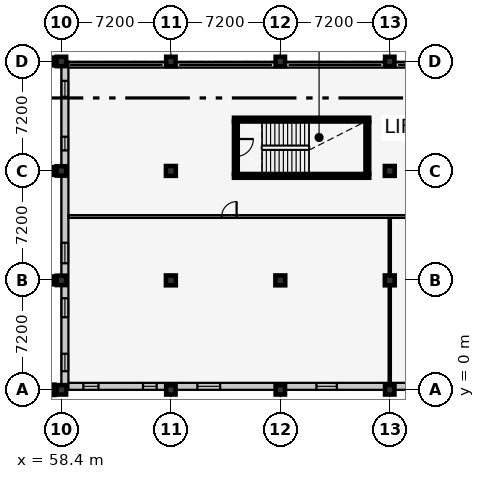
"""IFC4 building model, lengths in metres.
Left out: names, types, materials, properties, quantities, classifications, styles, units other than length and angle.
Written with IfcOpenShell. Run it as: python <this file> out.ifc"""

import sys

from ifc_helpers import new_model, si_unit, direction, frame, frame_2d, origin, origin_2d, place, context, subcontext, project, spatial, rectangle, extrude, element, fill, save


model = new_model("IFC4")
c1 = context("Model", 3, precision=1e-05, world=origin(), true_north=direction((0.0, 1.0)))
c2 = subcontext(c1, "Body", "Model", "MODEL_VIEW")
j1 = project(units=[si_unit("LENGTHUNIT", "METRE"), si_unit("PLANEANGLEUNIT", "RADIAN")], contexts=[c1])
p1 = place(None, origin())
s1 = spatial("IfcSite", under=j1, at=p1, CompositionType="ELEMENT")
p2 = place(p1, origin())
s2 = spatial("IfcBuilding", under=s1, at=p2, CompositionType="ELEMENT")
p3 = place(p2, frame((0.0, 0.0, 5.4)))
s3 = spatial("IfcBuildingStorey", under=s2, at=p3, CompositionType="ELEMENT", Elevation=5.4)
p4 = place(p3, frame((57.6, 0.0, 0.0), z_axis=(0.0, 0.0, 1.0), x_axis=(1.0, 0.0, 0.0)))
e1 = element("IfcColumn", 1, at=p4, inside=s3, PredefinedType="COLUMN", context=c2, shape_type="SweptSolid", body=[
    extrude(rectangle(XDim=0.68, YDim=0.68, at=origin_2d()), origin(), (0.0, 0.0, 1.0), 4.2),
])
for number, where, z_axis, x_axis in (
    (2, (57.6, 7.2, 0.0), (0.0, 0.0, 1.0), (1.0, 0.0, 0.0)),
    (3, (57.6, 14.4, 0.0), (0.0, 0.0, 1.0), (1.0, 0.0, 0.0)),
    (4, (57.6, 21.6, 0.0), (0.0, 0.0, 1.0), (1.0, 0.0, 0.0)),
):
    element("IfcColumn", number, at=place(p3, frame(where, z_axis=z_axis, x_axis=x_axis)), inside=s3, PredefinedType="COLUMN", context=c2, shape_type="SweptSolid", body=[
        extrude(rectangle(XDim=0.52, YDim=0.52, at=origin_2d()), origin(), (0.0, 0.0, 1.0), 4.2),
    ])
for number, where, z_axis, x_axis in (
    (5, (58.4, 0.0, 0.0), (0.0, 0.0, 1.0), (1.0, 0.0, 0.0)),
    (6, (58.4, 7.2, 0.0), (0.0, 0.0, 1.0), (1.0, 0.0, 0.0)),
    (7, (58.4, 14.4, 0.0), (0.0, 0.0, 1.0), (1.0, 0.0, 0.0)),
    (8, (58.4, 21.6, 0.0), (0.0, 0.0, 1.0), (1.0, 0.0, 0.0)),
    (9, (65.6, 0.0, 0.0), (0.0, 0.0, 1.0), (1.0, 0.0, 0.0)),
):
    element("IfcColumn", number, at=place(p3, frame(where, z_axis=z_axis, x_axis=x_axis)), inside=s3, PredefinedType="COLUMN", context=c2, shape_type="SweptSolid", body=[
        extrude(rectangle(XDim=0.62, YDim=0.62, at=origin_2d()), origin(), (0.0, 0.0, 1.0), 4.2),
    ])
for number, where, z_axis, x_axis in (
    (10, (65.6, 7.2, 0.0), (0.0, 0.0, 1.0), (1.0, 0.0, 0.0)),
    (11, (65.6, 14.4, 0.0), (0.0, 0.0, 1.0), (1.0, 0.0, 0.0)),
):
    element("IfcColumn", number, at=place(p3, frame(where, z_axis=z_axis, x_axis=x_axis)), inside=s3, PredefinedType="COLUMN", context=c2, shape_type="SweptSolid", body=[
        extrude(rectangle(XDim=0.65, YDim=0.65, at=origin_2d()), origin(), (0.0, 0.0, 1.0), 4.2),
    ])
for number, where, z_axis, x_axis in (
    (12, (65.6, 21.6, 0.0), (0.0, 0.0, 1.0), (1.0, 0.0, 0.0)),
    (13, (72.8, 0.0, 0.0), (0.0, 0.0, 1.0), (1.0, 0.0, 0.0)),
):
    element("IfcColumn", number, at=place(p3, frame(where, z_axis=z_axis, x_axis=x_axis)), inside=s3, PredefinedType="COLUMN", context=c2, shape_type="SweptSolid", body=[
        extrude(rectangle(XDim=0.62, YDim=0.62, at=origin_2d()), origin(), (0.0, 0.0, 1.0), 4.2),
    ])
p5 = place(p3, frame((72.8, 7.2, 0.0), z_axis=(0.0, 0.0, 1.0), x_axis=(1.0, 0.0, 0.0)))
e14 = element("IfcColumn", 14, at=p5, inside=s3, PredefinedType="COLUMN", context=c2, shape_type="SweptSolid", body=[
    extrude(rectangle(XDim=0.65, YDim=0.65, at=origin_2d()), origin(), (0.0, 0.0, 1.0), 4.2),
])
for number, where, z_axis, x_axis in (
    (15, (72.8, 21.6, 0.0), (0.0, 0.0, 1.0), (1.0, 0.0, 0.0)),
    (16, (80.0, 0.0, 0.0), (0.0, 0.0, 1.0), (1.0, 0.0, 0.0)),
):
    element("IfcColumn", number, at=place(p3, frame(where, z_axis=z_axis, x_axis=x_axis)), inside=s3, PredefinedType="COLUMN", context=c2, shape_type="SweptSolid", body=[
        extrude(rectangle(XDim=0.62, YDim=0.62, at=origin_2d()), origin(), (0.0, 0.0, 1.0), 4.2),
    ])
for number, where, z_axis, x_axis in (
    (17, (80.0, 7.2, 0.0), (0.0, 0.0, 1.0), (1.0, 0.0, 0.0)),
    (18, (80.0, 14.4, 0.0), (0.0, 0.0, 1.0), (1.0, 0.0, 0.0)),
):
    element("IfcColumn", number, at=place(p3, frame(where, z_axis=z_axis, x_axis=x_axis)), inside=s3, PredefinedType="COLUMN", context=c2, shape_type="SweptSolid", body=[
        extrude(rectangle(XDim=0.65, YDim=0.65, at=origin_2d()), origin(), (0.0, 0.0, 1.0), 4.2),
    ])
p6 = place(p3, frame((80.0, 21.6, 0.0), z_axis=(0.0, 0.0, 1.0), x_axis=(1.0, 0.0, 0.0)))
e19 = element("IfcColumn", 19, at=p6, inside=s3, PredefinedType="COLUMN", context=c2, shape_type="SweptSolid", body=[
    extrude(rectangle(XDim=0.62, YDim=0.62, at=origin_2d()), origin(), (0.0, 0.0, 1.0), 4.2),
])
p7 = place(p3, frame((108.8, 0.23, 0.0), z_axis=(0.0, 0.0, 1.0), x_axis=(-1.0, 0.0, 0.0)))
e20 = element("IfcWall", 20, at=p7, inside=s3, PredefinedType="SOLIDWALL", context=c2, shape_type="SweptSolid", body=[
    extrude(rectangle(XDim=50.4, YDim=0.46, at=frame_2d((25.2, 0.0))), origin(), (0.0, 0.0, 1.0), 3.245),
])
p8 = place(p7, frame((1.414, 0.0, 0.9)))
e21 = element("IfcOpeningElement", 21, at=p8, cuts=e20, PredefinedType="OPENING", context=c2, shape_type="SweptSolid", body=[
    extrude(rectangle(XDim=1.05, YDim=1.6, at=frame_2d((0.525, 0.8))), frame((0.0, 0.242, 0.0), z_axis=(0.0, -1.0, 0.0), x_axis=(1.0, 0.0, 0.0)), (0.0, 0.0, 1.0), 0.484),
])
p9 = place(p7, frame((9.067, 0.0, 0.9)))
e22 = element("IfcOpeningElement", 22, at=p9, cuts=e20, PredefinedType="OPENING", context=c2, shape_type="SweptSolid", body=[
    extrude(rectangle(XDim=1.25, YDim=1.6, at=frame_2d((0.625, 0.8))), frame((0.0, 0.242, 0.0), z_axis=(0.0, -1.0, 0.0), x_axis=(1.0, 0.0, 0.0)), (0.0, 0.0, 1.0), 0.484),
])
p10 = place(p7, frame((16.696, 0.0, 0.9)))
e23 = element("IfcOpeningElement", 23, at=p10, cuts=e20, PredefinedType="OPENING", context=c2, shape_type="SweptSolid", body=[
    extrude(rectangle(XDim=1.5, YDim=1.6, at=frame_2d((0.75, 0.8))), frame((0.0, 0.242, 0.0), z_axis=(0.0, -1.0, 0.0), x_axis=(1.0, 0.0, 0.0)), (0.0, 0.0, 1.0), 0.484),
])
p11 = place(p7, frame((24.64, 0.0, 0.9)))
e24 = element("IfcOpeningElement", 24, at=p11, cuts=e20, PredefinedType="OPENING", context=c2, shape_type="SweptSolid", body=[
    extrude(rectangle(XDim=1.12, YDim=1.75, at=frame_2d((0.56, 0.875))), frame((0.0, 0.242, 0.0), z_axis=(0.0, -1.0, 0.0), x_axis=(1.0, 0.0, 0.0)), (0.0, 0.0, 1.0), 0.484),
])
p12 = place(p7, frame((32.284, 0.0, 0.9)))
e25 = element("IfcOpeningElement", 25, at=p12, cuts=e20, PredefinedType="OPENING", context=c2, shape_type="SweptSolid", body=[
    extrude(rectangle(XDim=1.34, YDim=1.75, at=frame_2d((0.67, 0.875))), frame((0.0, 0.242, 0.0), z_axis=(0.0, -1.0, 0.0), x_axis=(1.0, 0.0, 0.0)), (0.0, 0.0, 1.0), 0.484),
])
p13 = place(p7, frame((39.958, 0.0, 0.9)))
e26 = element("IfcOpeningElement", 26, at=p13, cuts=e20, PredefinedType="OPENING", context=c2, shape_type="SweptSolid", body=[
    extrude(rectangle(XDim=1.5, YDim=1.75, at=frame_2d((0.75, 0.875))), frame((0.0, 0.242, 0.0), z_axis=(0.0, -1.0, 0.0), x_axis=(1.0, 0.0, 0.0)), (0.0, 0.0, 1.0), 0.484),
])
p14 = place(p7, frame((44.135, 0.0, 0.9)))
e27 = element("IfcOpeningElement", 27, at=p14, cuts=e20, PredefinedType="OPENING", context=c2, shape_type="SweptSolid", body=[
    extrude(rectangle(XDim=0.9, YDim=1.35, at=frame_2d((0.45, 0.675))), frame((0.0, 0.242, 0.0), z_axis=(0.0, -1.0, 0.0), x_axis=(1.0, 0.0, 0.0)), (0.0, 0.0, 1.0), 0.484),
])
p15 = place(p7, frame((47.961, 0.0, 0.9)))
e28 = element("IfcOpeningElement", 28, at=p15, cuts=e20, PredefinedType="OPENING", context=c2, shape_type="SweptSolid", body=[
    extrude(rectangle(XDim=1.0, YDim=1.35, at=frame_2d((0.5, 0.675))), frame((0.0, 0.242, 0.0), z_axis=(0.0, -1.0, 0.0), x_axis=(1.0, 0.0, 0.0)), (0.0, 0.0, 1.0), 0.484),
])
p16 = place(p3, frame((58.4, 21.37, 0.0), z_axis=(0.0, 0.0, 1.0), x_axis=(1.0, 0.0, 0.0)))
e29 = element("IfcWall", 29, at=p16, inside=s3, PredefinedType="SOLIDWALL", context=c2, shape_type="SweptSolid", body=[
    extrude(rectangle(XDim=50.4, YDim=0.35, at=frame_2d((25.2, 0.0))), origin(), (0.0, 0.0, 1.0), 0.85),
])
p17 = place(p3, frame((58.63, 0.0, 0.0), z_axis=(0.0, 0.0, 1.0), x_axis=(0.0, 1.0, 0.0)))
e30 = element("IfcWall", 30, at=p17, inside=s3, PredefinedType="SOLIDWALL", context=c2, shape_type="SweptSolid", body=[
    extrude(rectangle(XDim=21.6, YDim=0.46, at=frame_2d((10.8, 0.0))), origin(), (0.0, 0.0, 1.0), 3.205),
])
p18 = place(p17, frame((1.225, 0.0, 0.9)))
e31 = element("IfcOpeningElement", 31, at=p18, cuts=e30, PredefinedType="OPENING", context=c2, shape_type="SweptSolid", body=[
    extrude(rectangle(XDim=1.15, YDim=1.45, at=frame_2d((0.575, 0.725))), frame((0.0, 0.242, 0.0), z_axis=(0.0, -1.0, 0.0), x_axis=(1.0, 0.0, 0.0)), (0.0, 0.0, 1.0), 0.484),
])
p19 = place(p17, frame((4.775, 0.0, 0.9)))
e32 = element("IfcOpeningElement", 32, at=p19, cuts=e30, PredefinedType="OPENING", context=c2, shape_type="SweptSolid", body=[
    extrude(rectangle(XDim=1.25, YDim=1.45, at=frame_2d((0.625, 0.725))), frame((0.0, 0.242, 0.0), z_axis=(0.0, -1.0, 0.0), x_axis=(1.0, 0.0, 0.0)), (0.0, 0.0, 1.0), 0.484),
])
p20 = place(p17, frame((8.325, 0.0, 0.9)))
e33 = element("IfcOpeningElement", 33, at=p20, cuts=e30, PredefinedType="OPENING", context=c2, shape_type="SweptSolid", body=[
    extrude(rectangle(XDim=1.35, YDim=1.45, at=frame_2d((0.675, 0.725))), frame((0.0, 0.242, 0.0), z_axis=(0.0, -1.0, 0.0), x_axis=(1.0, 0.0, 0.0)), (0.0, 0.0, 1.0), 0.484),
])
p21 = place(p17, frame((15.75, 0.0, 0.9)))
e34 = element("IfcOpeningElement", 34, at=p21, cuts=e30, PredefinedType="OPENING", context=c2, shape_type="SweptSolid", body=[
    extrude(rectangle(XDim=0.9, YDim=1.6, at=frame_2d((0.45, 0.8))), frame((0.0, 0.242, 0.0), z_axis=(0.0, -1.0, 0.0), x_axis=(1.0, 0.0, 0.0)), (0.0, 0.0, 1.0), 0.484),
])
p22 = place(p17, frame((19.275, 0.0, 0.9)))
e35 = element("IfcOpeningElement", 35, at=p22, cuts=e30, PredefinedType="OPENING", context=c2, shape_type="SweptSolid", body=[
    extrude(rectangle(XDim=1.05, YDim=1.6, at=frame_2d((0.525, 0.8))), frame((0.0, 0.242, 0.0), z_axis=(0.0, -1.0, 0.0), x_axis=(1.0, 0.0, 0.0)), (0.0, 0.0, 1.0), 0.484),
])
for number, where, z_axis, x_axis in (
    (36, (69.75, 14.075, 0.0), (0.0, 0.0, 1.0), (1.0, 0.0, 0.0)),
    (37, (78.65, 17.775, 0.0), (0.0, 0.0, 1.0), (-1.0, 0.0, 0.0)),
):
    element("IfcWall", number, at=place(p3, frame(where, z_axis=z_axis, x_axis=x_axis)), inside=s3, PredefinedType="SHEAR", context=c2, shape_type="SweptSolid", body=[
        extrude(rectangle(XDim=8.9, YDim=0.25, at=frame_2d((4.45, 0.0))), origin(), (0.0, 0.0, 1.0), 3.95),
    ])
p23 = place(p3, frame((69.875, 17.65, 0.0), z_axis=(0.0, 0.0, 1.0), x_axis=(0.0, -1.0, 0.0)))
e38 = element("IfcWall", 38, at=p23, inside=s3, PredefinedType="SHEAR", context=c2, shape_type="SweptSolid", body=[
    extrude(rectangle(XDim=3.45, YDim=0.25, at=frame_2d((1.725, 0.0))), origin(), (0.0, 0.0, 1.0), 3.95),
])
p24 = place(p23, frame((1.15, 0.0, 0.0)))
e39 = element("IfcOpeningElement", 39, at=p24, cuts=e38, PredefinedType="OPENING", context=c2, shape_type="SweptSolid", body=[
    extrude(rectangle(XDim=1.15, YDim=2.15, at=frame_2d((0.575, 1.075))), frame((0.0, 0.137, 0.0), z_axis=(0.0, -1.0, 0.0), x_axis=(1.0, 0.0, 0.0)), (0.0, 0.0, 1.0), 0.274),
])
p25 = place(p3, frame((78.525, 14.2, 0.0), z_axis=(0.0, 0.0, 1.0), x_axis=(0.0, 1.0, 0.0)))
e40 = element("IfcWall", 40, at=p25, inside=s3, PredefinedType="SHEAR", context=c2, shape_type="SweptSolid", body=[
    extrude(rectangle(XDim=3.45, YDim=0.25, at=frame_2d((1.725, 0.0))), origin(), (0.0, 0.0, 1.0), 3.95),
])
p26 = place(p3, frame((58.87, 11.4, 0.0), z_axis=(0.0, 0.0, 1.0), x_axis=(1.0, 0.0, 0.0)))
e41 = element("IfcWall", 41, at=p26, inside=s3, PredefinedType="PARTITIONING", context=c2, shape_type="SweptSolid", body=[
    extrude(rectangle(XDim=49.46, YDim=0.18, at=frame_2d((24.73, 0.0))), origin(), (0.0, 0.0, 1.0), 3.95),
])
p27 = place(p26, frame((10.075, 0.0, 0.0)))
e42 = element("IfcOpeningElement", 42, at=p27, cuts=e41, PredefinedType="OPENING", context=c2, shape_type="SweptSolid", body=[
    extrude(rectangle(XDim=0.98, YDim=2.12, at=frame_2d((0.49, 1.06))), frame((0.0, 0.102, 0.0), z_axis=(0.0, -1.0, 0.0), x_axis=(1.0, 0.0, 0.0)), (0.0, 0.0, 1.0), 0.204),
])
p28 = place(p26, frame((28.65, 0.0, 0.0)))
e43 = element("IfcOpeningElement", 43, at=p28, cuts=e41, PredefinedType="OPENING", context=c2, shape_type="SweptSolid", body=[
    extrude(rectangle(XDim=0.96, YDim=2.1, at=frame_2d((0.48, 1.05))), frame((0.0, 0.102, 0.0), z_axis=(0.0, -1.0, 0.0), x_axis=(1.0, 0.0, 0.0)), (0.0, 0.0, 1.0), 0.204),
])
p29 = place(p26, frame((42.825, 0.0, 0.0)))
e44 = element("IfcOpeningElement", 44, at=p29, cuts=e41, PredefinedType="OPENING", context=c2, shape_type="SweptSolid", body=[
    extrude(rectangle(XDim=0.94, YDim=2.1, at=frame_2d((0.47, 1.05))), frame((0.0, 0.102, 0.0), z_axis=(0.0, -1.0, 0.0), x_axis=(1.0, 0.0, 0.0)), (0.0, 0.0, 1.0), 0.204),
])
p30 = place(p3, frame((80.0, 0.47, 0.0), z_axis=(0.0, 0.0, 1.0), x_axis=(0.0, 1.0, 0.0)))
e45 = element("IfcWall", 45, at=p30, inside=s3, PredefinedType="PARTITIONING", context=c2, shape_type="SweptSolid", body=[
    extrude(rectangle(XDim=10.83, YDim=0.15, at=frame_2d((5.415, 0.0))), origin(), (0.0, 0.0, 1.0), 3.325),
])
p31 = place(p12, origin())
e46 = element("IfcWindow", 46, at=p31, inside=s3, PartitioningType="SINGLE_PANEL", PredefinedType="WINDOW", context=c2, shape_type="SweptSolid", body=[
    extrude(rectangle(XDim=1.34, YDim=1.75, at=frame_2d((0.67, 0.875))), frame((0.0, 0.03, 0.0), z_axis=(0.0, -1.0, 0.0), x_axis=(1.0, 0.0, 0.0)), (0.0, 0.0, 1.0), 0.06),
])
fill(e25, e46)
p32 = place(p13, origin())
e47 = element("IfcWindow", 47, at=p32, inside=s3, PartitioningType="SINGLE_PANEL", PredefinedType="WINDOW", context=c2, shape_type="SweptSolid", body=[
    extrude(rectangle(XDim=1.5, YDim=1.75, at=frame_2d((0.75, 0.875))), frame((0.0, 0.03, 0.0), z_axis=(0.0, -1.0, 0.0), x_axis=(1.0, 0.0, 0.0)), (0.0, 0.0, 1.0), 0.06),
])
fill(e26, e47)
p33 = place(p14, origin())
e48 = element("IfcWindow", 48, at=p33, inside=s3, PartitioningType="SINGLE_PANEL", PredefinedType="WINDOW", context=c2, shape_type="SweptSolid", body=[
    extrude(rectangle(XDim=0.9, YDim=1.35, at=frame_2d((0.45, 0.675))), frame((0.0, 0.03, 0.0), z_axis=(0.0, -1.0, 0.0), x_axis=(1.0, 0.0, 0.0)), (0.0, 0.0, 1.0), 0.06),
])
fill(e27, e48)
p34 = place(p15, origin())
e49 = element("IfcWindow", 49, at=p34, inside=s3, PartitioningType="SINGLE_PANEL", PredefinedType="WINDOW", context=c2, shape_type="SweptSolid", body=[
    extrude(rectangle(XDim=1.0, YDim=1.35, at=frame_2d((0.5, 0.675))), frame((0.0, 0.03, 0.0), z_axis=(0.0, -1.0, 0.0), x_axis=(1.0, 0.0, 0.0)), (0.0, 0.0, 1.0), 0.06),
])
fill(e28, e49)
p35 = place(p18, origin())
e50 = element("IfcWindow", 50, at=p35, inside=s3, PartitioningType="SINGLE_PANEL", PredefinedType="WINDOW", context=c2, shape_type="SweptSolid", body=[
    extrude(rectangle(XDim=1.15, YDim=1.45, at=frame_2d((0.575, 0.725))), frame((0.0, 0.03, 0.0), z_axis=(0.0, -1.0, 0.0), x_axis=(1.0, 0.0, 0.0)), (0.0, 0.0, 1.0), 0.06),
])
fill(e31, e50)
p36 = place(p19, origin())
e51 = element("IfcWindow", 51, at=p36, inside=s3, PartitioningType="SINGLE_PANEL", PredefinedType="WINDOW", context=c2, shape_type="SweptSolid", body=[
    extrude(rectangle(XDim=1.25, YDim=1.45, at=frame_2d((0.625, 0.725))), frame((0.0, 0.03, 0.0), z_axis=(0.0, -1.0, 0.0), x_axis=(1.0, 0.0, 0.0)), (0.0, 0.0, 1.0), 0.06),
])
fill(e32, e51)
p37 = place(p20, origin())
e52 = element("IfcWindow", 52, at=p37, inside=s3, PartitioningType="SINGLE_PANEL", PredefinedType="WINDOW", context=c2, shape_type="SweptSolid", body=[
    extrude(rectangle(XDim=1.35, YDim=1.45, at=frame_2d((0.675, 0.725))), frame((0.0, 0.03, 0.0), z_axis=(0.0, -1.0, 0.0), x_axis=(1.0, 0.0, 0.0)), (0.0, 0.0, 1.0), 0.06),
])
fill(e33, e52)
p38 = place(p21, origin())
e53 = element("IfcWindow", 53, at=p38, inside=s3, PartitioningType="SINGLE_PANEL", PredefinedType="WINDOW", context=c2, shape_type="SweptSolid", body=[
    extrude(rectangle(XDim=0.9, YDim=1.6, at=frame_2d((0.45, 0.8))), frame((0.0, 0.03, 0.0), z_axis=(0.0, -1.0, 0.0), x_axis=(1.0, 0.0, 0.0)), (0.0, 0.0, 1.0), 0.06),
])
fill(e34, e53)
p39 = place(p22, origin())
e54 = element("IfcWindow", 54, at=p39, inside=s3, PartitioningType="SINGLE_PANEL", PredefinedType="WINDOW", context=c2, shape_type="SweptSolid", body=[
    extrude(rectangle(XDim=1.05, YDim=1.6, at=frame_2d((0.525, 0.8))), frame((0.0, 0.03, 0.0), z_axis=(0.0, -1.0, 0.0), x_axis=(1.0, 0.0, 0.0)), (0.0, 0.0, 1.0), 0.06),
])
fill(e35, e54)
p40 = place(p24, origin())
e55 = element("IfcDoor", 55, at=p40, inside=s3, OperationType="SINGLE_SWING_LEFT", PredefinedType="DOOR", context=c2, shape_type="SweptSolid", body=[
    extrude(rectangle(XDim=1.15, YDim=2.15, at=frame_2d((0.575, 1.075))), frame((0.0, 0.025, 0.0), z_axis=(0.0, -1.0, 0.0), x_axis=(1.0, 0.0, 0.0)), (0.0, 0.0, 1.0), 0.05),
])
fill(e39, e55)
p41 = place(p27, origin())
e56 = element("IfcDoor", 56, at=p41, inside=s3, OperationType="SINGLE_SWING_RIGHT", PredefinedType="DOOR", context=c2, shape_type="SweptSolid", body=[
    extrude(rectangle(XDim=0.98, YDim=2.12, at=frame_2d((0.49, 1.06))), frame((0.0, 0.025, 0.0), z_axis=(0.0, -1.0, 0.0), x_axis=(1.0, 0.0, 0.0)), (0.0, 0.0, 1.0), 0.05),
])
fill(e42, e56)
save(model, sys.argv[1])
